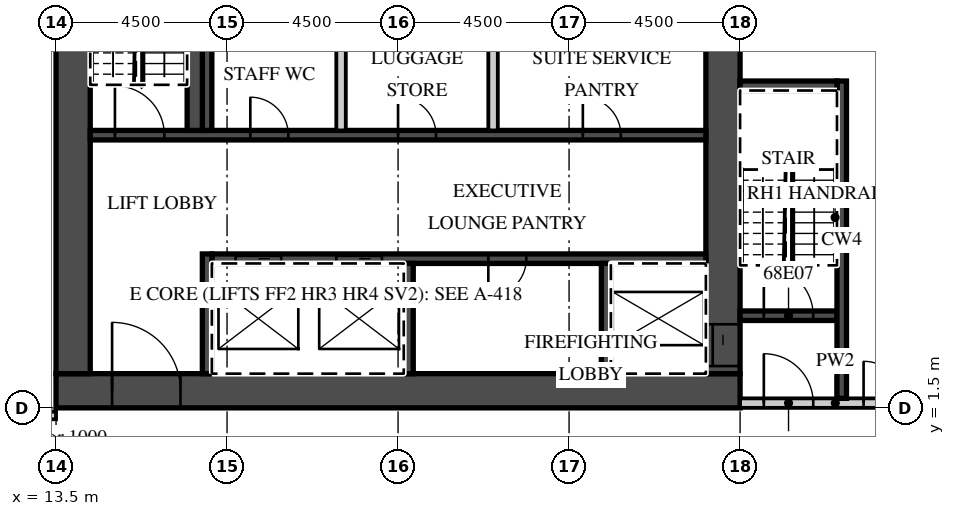
"""IFC4 building model, lengths in metres.
Left out: names, types, materials, properties, quantities, classifications, styles, units other than length and angle.
Written with IfcOpenShell. Run it as: python <this file> out.ifc"""

import sys

from ifc_helpers import new_model, si_unit, direction, frame, frame_2d, origin, place, context, subcontext, project, spatial, rectangle, extrude, element, fill, save


model = new_model("IFC4")
c1 = context("Model", 3, precision=1e-05, world=origin(), true_north=direction((0.0, 1.0)))
c2 = subcontext(c1, "Body", "Model", "MODEL_VIEW")
j1 = project(units=[si_unit("LENGTHUNIT", "METRE"), si_unit("PLANEANGLEUNIT", "RADIAN")], contexts=[c1])
p1 = place(None, origin())
s1 = spatial("IfcSite", under=j1, at=p1, CompositionType="ELEMENT")
p2 = place(p1, origin())
s2 = spatial("IfcBuilding", under=s1, at=p2, CompositionType="ELEMENT")
p3 = place(p2, frame((0.0, 0.0, 275.1)))
s3 = spatial("IfcBuildingStorey", under=s2, at=p3, CompositionType="ELEMENT", Elevation=275.1)
p4 = place(p3, frame((38.132, -12.858, 0.0), z_axis=(0.0, 0.0, 1.0), x_axis=(-0.095847749461, 0.995396006082, 0.0)))
e1 = element("IfcWall", 1, at=p4, inside=s3, PredefinedType="SOLIDWALL", context=c2, shape_type="SweptSolid", body=[
    extrude(rectangle(XDim=32.0, YDim=0.45, at=frame_2d((16.0, 0.0))), origin(), (0.0, 0.0, 1.0), 3.02),
])
p5 = place(p3, frame((-39.909, 1.3, 0.0), z_axis=(0.0, 0.0, 1.0), x_axis=(1.0, 0.0, 0.0)))
e2 = element("IfcWall", 2, at=p5, inside=s3, PredefinedType="PARTITIONING", context=c2, shape_type="SweptSolid", body=[
    extrude(rectangle(XDim=53.409, YDim=0.2, at=frame_2d((26.705, 0.0))), origin(), (0.0, 0.0, 1.0), 3.02),
])
p6 = place(p5, frame((0.15, 0.0, 0.0)))
e3 = element("IfcOpeningElement", 3, at=p6, cuts=e2, PredefinedType="OPENING", context=c2, shape_type="SweptSolid", body=[
    extrude(rectangle(XDim=0.9, YDim=2.1, at=frame_2d((0.45, 1.05))), frame((0.0, 0.11, 0.0), z_axis=(0.0, -1.0, 0.0), x_axis=(1.0, 0.0, 0.0)), (0.0, 0.0, 1.0), 0.22),
])
p7 = place(p5, frame((9.271, 0.0, 0.0)))
e4 = element("IfcOpeningElement", 4, at=p7, cuts=e2, PredefinedType="OPENING", context=c2, shape_type="SweptSolid", body=[
    extrude(rectangle(XDim=1.2, YDim=2.1, at=frame_2d((0.6, 1.05))), frame((0.0, 0.11, 0.0), z_axis=(0.0, -1.0, 0.0), x_axis=(1.0, 0.0, 0.0)), (0.0, 0.0, 1.0), 0.22),
])
p8 = place(p5, frame((18.271, 0.0, 0.0)))
e5 = element("IfcOpeningElement", 5, at=p8, cuts=e2, PredefinedType="OPENING", context=c2, shape_type="SweptSolid", body=[
    extrude(rectangle(XDim=1.2, YDim=2.1, at=frame_2d((0.6, 1.05))), frame((0.0, 0.11, 0.0), z_axis=(0.0, -1.0, 0.0), x_axis=(1.0, 0.0, 0.0)), (0.0, 0.0, 1.0), 0.22),
])
p9 = place(p5, frame((27.271, 0.0, 0.0)))
e6 = element("IfcOpeningElement", 6, at=p9, cuts=e2, PredefinedType="OPENING", context=c2, shape_type="SweptSolid", body=[
    extrude(rectangle(XDim=1.2, YDim=2.1, at=frame_2d((0.6, 1.05))), frame((0.0, 0.11, 0.0), z_axis=(0.0, -1.0, 0.0), x_axis=(1.0, 0.0, 0.0)), (0.0, 0.0, 1.0), 0.22),
])
p10 = place(p5, frame((36.271, 0.0, 0.0)))
e7 = element("IfcOpeningElement", 7, at=p10, cuts=e2, PredefinedType="OPENING", context=c2, shape_type="SweptSolid", body=[
    extrude(rectangle(XDim=1.2, YDim=2.1, at=frame_2d((0.6, 1.05))), frame((0.0, 0.11, 0.0), z_axis=(0.0, -1.0, 0.0), x_axis=(1.0, 0.0, 0.0)), (0.0, 0.0, 1.0), 0.22),
])
p11 = place(p5, frame((42.346, 0.0, 0.0)))
e8 = element("IfcOpeningElement", 8, at=p11, cuts=e2, PredefinedType="OPENING", context=c2, shape_type="SweptSolid", body=[
    extrude(rectangle(XDim=1.2, YDim=2.1, at=frame_2d((0.6, 1.05))), frame((0.0, 0.11, 0.0), z_axis=(0.0, -1.0, 0.0), x_axis=(1.0, 0.0, 0.0)), (0.0, 0.0, 1.0), 0.22),
])
p12 = place(p5, frame((51.834, 0.0, 0.0)))
e9 = element("IfcOpeningElement", 9, at=p12, cuts=e2, PredefinedType="OPENING", context=c2, shape_type="SweptSolid", body=[
    extrude(rectangle(XDim=1.0, YDim=2.1, at=frame_2d((0.5, 1.05))), frame((0.0, 0.11, 0.0), z_axis=(0.0, -1.0, 0.0), x_axis=(1.0, 0.0, 0.0)), (0.0, 0.0, 1.0), 0.22),
])
p13 = place(p3, frame((13.5, 1.95, 0.0), z_axis=(0.0, 0.0, 1.0), x_axis=(1.0, 0.0, 0.0)))
e10 = element("IfcWall", 10, at=p13, inside=s3, PredefinedType="SHEAR", context=c2, shape_type="SweptSolid", body=[
    extrude(rectangle(XDim=18.0, YDim=0.9, at=frame_2d((9.0, 0.0))), origin(), (0.0, 0.0, 1.0), 3.02),
])
p14 = place(p13, frame((1.475, 0.0, 0.0)))
e11 = element("IfcOpeningElement", 11, at=p14, cuts=e10, PredefinedType="OPENING", context=c2, shape_type="SweptSolid", body=[
    extrude(rectangle(XDim=1.8, YDim=2.1, at=frame_2d((0.9, 1.05))), frame((0.0, 0.46, 0.0), z_axis=(0.0, -1.0, 0.0), x_axis=(1.0, 0.0, 0.0)), (0.0, 0.0, 1.0), 0.92),
])
p15 = place(p3, frame((31.05, 2.4, 0.0), z_axis=(0.0, 0.0, 1.0), x_axis=(0.0, 1.0, 0.0)))
e12 = element("IfcWall", 12, at=p15, inside=s3, PredefinedType="SHEAR", context=c2, shape_type="SweptSolid", body=[
    extrude(rectangle(XDim=12.8, YDim=0.9, at=frame_2d((6.4, 0.0))), origin(), (0.0, 0.0, 1.0), 3.02),
])
p16 = place(p15, frame((0.2, 0.0, 0.0)))
e13 = element("IfcOpeningElement", 13, at=p16, cuts=e12, PredefinedType="OPENING", context=c2, shape_type="SweptSolid", body=[
    extrude(rectangle(XDim=1.1, YDim=2.1, at=frame_2d((0.55, 1.05))), frame((0.0, 0.46, 0.0), z_axis=(0.0, -1.0, 0.0), x_axis=(1.0, 0.0, 0.0)), (0.0, 0.0, 1.0), 0.92),
])
p17 = place(p3, frame((13.95, 2.4, 0.0), z_axis=(0.0, 0.0, 1.0), x_axis=(0.0, 1.0, 0.0)))
e14 = element("IfcWall", 14, at=p17, inside=s3, PredefinedType="SHEAR", context=c2, shape_type="SweptSolid", body=[
    extrude(rectangle(XDim=12.2, YDim=0.9, at=frame_2d((6.1, 0.0))), origin(), (0.0, 0.0, 1.0), 3.02),
])
p18 = place(p3, frame((17.6, 5.425, 0.0), z_axis=(0.0, 0.0, 1.0), x_axis=(1.0, 0.0, 0.0)))
e15 = element("IfcWall", 15, at=p18, inside=s3, PredefinedType="SHEAR", context=c2, shape_type="SweptSolid", body=[
    extrude(rectangle(XDim=13.0, YDim=0.25, at=frame_2d((6.5, 0.0))), origin(), (0.0, 0.0, 1.0), 3.02),
])
p19 = place(p18, frame((3.275, 0.0, 0.0)))
e16 = element("IfcOpeningElement", 16, at=p19, cuts=e15, PredefinedType="OPENING", context=c2, shape_type="SweptSolid", body=[
    extrude(rectangle(XDim=1.2, YDim=2.1, at=frame_2d((0.6, 1.05))), frame((0.0, 0.135, 0.0), z_axis=(0.0, -1.0, 0.0), x_axis=(1.0, 0.0, 0.0)), (0.0, 0.0, 1.0), 0.27),
])
p20 = place(p18, frame((0.625, 0.0, 0.0)))
e17 = element("IfcOpeningElement", 17, at=p20, cuts=e15, PredefinedType="OPENING", context=c2, shape_type="SweptSolid", body=[
    extrude(rectangle(XDim=1.2, YDim=2.1, at=frame_2d((0.6, 1.05))), frame((0.0, 0.135, 0.0), z_axis=(0.0, -1.0, 0.0), x_axis=(1.0, 0.0, 0.0)), (0.0, 0.0, 1.0), 0.27),
])
p21 = place(p18, frame((7.275, 0.0, 0.0)))
e18 = element("IfcOpeningElement", 18, at=p21, cuts=e15, PredefinedType="OPENING", context=c2, shape_type="SweptSolid", body=[
    extrude(rectangle(XDim=1.0, YDim=2.1, at=frame_2d((0.5, 1.05))), frame((0.0, 0.135, 0.0), z_axis=(0.0, -1.0, 0.0), x_axis=(1.0, 0.0, 0.0)), (0.0, 0.0, 1.0), 0.27),
])
p22 = place(p3, frame((17.475, 2.4, 0.0), z_axis=(0.0, 0.0, 1.0), x_axis=(0.0, 1.0, 0.0)))
e19 = element("IfcWall", 19, at=p22, inside=s3, PredefinedType="SHEAR", context=c2, shape_type="SweptSolid", body=[
    extrude(rectangle(XDim=3.15, YDim=0.25, at=frame_2d((1.575, 0.0))), origin(), (0.0, 0.0, 1.0), 3.02),
])
for number, where, z_axis, x_axis in (
    (20, (27.975, 2.4, 0.0), (0.0, 0.0, 1.0), (0.0, 1.0, 0.0)),
    (21, (22.775, 2.4, 0.0), (0.0, 0.0, 1.0), (0.0, 1.0, 0.0)),
):
    element("IfcWall", number, at=place(p3, frame(where, z_axis=z_axis, x_axis=x_axis)), inside=s3, PredefinedType="SHEAR", context=c2, shape_type="SweptSolid", body=[
        extrude(rectangle(XDim=2.9, YDim=0.25, at=frame_2d((1.45, 0.0))), origin(), (0.0, 0.0, 1.0), 3.02),
    ])
p23 = place(p3, frame((14.4, 8.675, 0.0), z_axis=(0.0, 0.0, 1.0), x_axis=(1.0, 0.0, 0.0)))
e22 = element("IfcWall", 22, at=p23, inside=s3, PredefinedType="SHEAR", context=c2, shape_type="SweptSolid", body=[
    extrude(rectangle(XDim=16.2, YDim=0.25, at=frame_2d((8.1, 0.0))), origin(), (0.0, 0.0, 1.0), 3.02),
])
p24 = place(p23, frame((0.65, 0.0, 0.0)))
e23 = element("IfcOpeningElement", 23, at=p24, cuts=e22, PredefinedType="OPENING", context=c2, shape_type="SweptSolid", body=[
    extrude(rectangle(XDim=1.3, YDim=2.1, at=frame_2d((0.65, 1.05))), frame((0.0, 0.135, 0.0), z_axis=(0.0, -1.0, 0.0), x_axis=(1.0, 0.0, 0.0)), (0.0, 0.0, 1.0), 0.27),
])
p25 = place(p23, frame((12.962, 0.0, 0.0)))
e24 = element("IfcOpeningElement", 24, at=p25, cuts=e22, PredefinedType="OPENING", context=c2, shape_type="SweptSolid", body=[
    extrude(rectangle(XDim=1.0, YDim=2.1, at=frame_2d((0.5, 1.05))), frame((0.0, 0.135, 0.0), z_axis=(0.0, -1.0, 0.0), x_axis=(1.0, 0.0, 0.0)), (0.0, 0.0, 1.0), 0.27),
])
p26 = place(p23, frame((8.1, 0.0, 0.0)))
e25 = element("IfcOpeningElement", 25, at=p26, cuts=e22, PredefinedType="OPENING", context=c2, shape_type="SweptSolid", body=[
    extrude(rectangle(XDim=1.0, YDim=2.1, at=frame_2d((0.5, 1.05))), frame((0.0, 0.135, 0.0), z_axis=(0.0, -1.0, 0.0), x_axis=(1.0, 0.0, 0.0)), (0.0, 0.0, 1.0), 0.27),
])
p27 = place(p23, frame((4.212, 0.0, 0.0)))
e26 = element("IfcOpeningElement", 26, at=p27, cuts=e22, PredefinedType="OPENING", context=c2, shape_type="SweptSolid", body=[
    extrude(rectangle(XDim=1.0, YDim=2.1, at=frame_2d((0.5, 1.05))), frame((0.0, 0.135, 0.0), z_axis=(0.0, -1.0, 0.0), x_axis=(1.0, 0.0, 0.0)), (0.0, 0.0, 1.0), 0.27),
])
p28 = place(p3, frame((17.475, 8.8, 0.0), z_axis=(0.0, 0.0, 1.0), x_axis=(0.0, 1.0, 0.0)))
e27 = element("IfcWall", 27, at=p28, inside=s3, PredefinedType="SHEAR", context=c2, shape_type="SweptSolid", body=[
    extrude(rectangle(XDim=2.9, YDim=0.25, at=frame_2d((1.45, 0.0))), origin(), (0.0, 0.0, 1.0), 3.02),
])
for number, where, z_axis, x_axis in (
    (28, (25.0, 8.8, 0.0), (0.0, 0.0, 1.0), (0.0, 1.0, 0.0)),
    (29, (21.0, 8.8, 0.0), (0.0, 0.0, 1.0), (0.0, 1.0, 0.0)),
):
    element("IfcWall", number, at=place(p3, frame(where, z_axis=z_axis, x_axis=x_axis)), inside=s3, PredefinedType="PARTITIONING", context=c2, shape_type="SweptSolid", body=[
        extrude(rectangle(XDim=2.9, YDim=0.25, at=frame_2d((1.45, 0.0))), origin(), (0.0, 0.0, 1.0), 3.02),
    ])
p29 = place(p3, frame((17.15, 8.8, 0.0), z_axis=(0.0, 0.0, 1.0), x_axis=(0.0, 1.0, 0.0)))
e30 = element("IfcWall", 30, at=p29, inside=s3, PredefinedType="SHEAR", context=c2, shape_type="SweptSolid", body=[
    extrude(rectangle(XDim=5.8, YDim=0.4, at=frame_2d((2.9, 0.0))), origin(), (0.0, 0.0, 1.0), 3.02),
])
p30 = place(p3, frame((31.5, 1.625, 0.0), z_axis=(0.0, 0.0, 1.0), x_axis=(1.0, 0.0, 0.0)))
e31 = element("IfcWall", 31, at=p30, inside=s3, PredefinedType="PARTITIONING", context=c2, shape_type="SweptSolid", body=[
    extrude(rectangle(XDim=5.012, YDim=0.25, at=frame_2d((2.506, 0.0))), origin(), (0.0, 0.0, 1.0), 3.02),
])
p31 = place(p30, frame((0.625, 0.0, 0.0)))
e32 = element("IfcOpeningElement", 32, at=p31, cuts=e31, PredefinedType="OPENING", context=c2, shape_type="SweptSolid", body=[
    extrude(rectangle(XDim=1.3, YDim=2.1, at=frame_2d((0.65, 1.05))), frame((0.0, 0.135, 0.0), z_axis=(0.0, -1.0, 0.0), x_axis=(1.0, 0.0, 0.0)), (0.0, 0.0, 1.0), 0.27),
])
p32 = place(p30, frame((3.25, 0.0, 0.0)))
e33 = element("IfcOpeningElement", 33, at=p32, cuts=e31, PredefinedType="OPENING", context=c2, shape_type="SweptSolid", body=[
    extrude(rectangle(XDim=1.1, YDim=2.1, at=frame_2d((0.55, 1.05))), frame((0.0, 0.135, 0.0), z_axis=(0.0, -1.0, 0.0), x_axis=(1.0, 0.0, 0.0)), (0.0, 0.0, 1.0), 0.27),
])
p33 = place(p3, frame((31.5, 3.925, 0.0), z_axis=(0.0, 0.0, 1.0), x_axis=(1.0, 0.0, 0.0)))
e34 = element("IfcWall", 34, at=p33, inside=s3, PredefinedType="SHEAR", context=c2, shape_type="SweptSolid", body=[
    extrude(rectangle(XDim=2.55, YDim=0.25, at=frame_2d((1.275, 0.0))), origin(), (0.0, 0.0, 1.0), 3.02),
])
p34 = place(p33, frame((0.625, 0.0, 0.0)))
e35 = element("IfcOpeningElement", 35, at=p34, cuts=e34, PredefinedType="OPENING", context=c2, shape_type="SweptSolid", body=[
    extrude(rectangle(XDim=1.3, YDim=2.1, at=frame_2d((0.65, 1.05))), frame((0.0, 0.135, 0.0), z_axis=(0.0, -1.0, 0.0), x_axis=(1.0, 0.0, 0.0)), (0.0, 0.0, 1.0), 0.27),
])
p35 = place(p3, frame((34.175, 1.75, 0.0), z_axis=(0.0, 0.0, 1.0), x_axis=(0.0, 1.0, 0.0)))
e36 = element("IfcWall", 36, at=p35, inside=s3, PredefinedType="SHEAR", context=c2, shape_type="SweptSolid", body=[
    extrude(rectangle(XDim=8.35, YDim=0.25, at=frame_2d((4.175, 0.0))), origin(), (0.0, 0.0, 1.0), 3.02),
])
p36 = place(p3, frame((31.5, 9.975, 0.0), z_axis=(0.0, 0.0, 1.0), x_axis=(1.0, 0.0, 0.0)))
e37 = element("IfcWall", 37, at=p36, inside=s3, PredefinedType="SHEAR", context=c2, shape_type="SweptSolid", body=[
    extrude(rectangle(XDim=2.55, YDim=0.25, at=frame_2d((1.275, 0.0))), origin(), (0.0, 0.0, 1.0), 3.02),
])
p37 = place(p19, origin())
e38 = element("IfcDoor", 38, at=p37, inside=s3, OperationType="SLIDING_TO_RIGHT", PredefinedType="DOOR", context=c2, shape_type="SweptSolid", body=[
    extrude(rectangle(XDim=1.2, YDim=2.1, at=frame_2d((0.6, 1.05))), frame((0.0, 0.025, 0.0), z_axis=(0.0, -1.0, 0.0), x_axis=(1.0, 0.0, 0.0)), (0.0, 0.0, 1.0), 0.05),
])
fill(e16, e38)
p38 = place(p20, origin())
e39 = element("IfcDoor", 39, at=p38, inside=s3, OperationType="SLIDING_TO_LEFT", PredefinedType="DOOR", context=c2, shape_type="SweptSolid", body=[
    extrude(rectangle(XDim=1.2, YDim=2.1, at=frame_2d((0.6, 1.05))), frame((0.0, 0.025, 0.0), z_axis=(0.0, -1.0, 0.0), x_axis=(1.0, 0.0, 0.0)), (0.0, 0.0, 1.0), 0.05),
])
fill(e17, e39)
p39 = place(p16, origin())
e40 = element("IfcDoor", 40, at=p39, inside=s3, OperationType="SLIDING_TO_LEFT", PredefinedType="DOOR", context=c2, shape_type="SweptSolid", body=[
    extrude(rectangle(XDim=1.1, YDim=2.1, at=frame_2d((0.55, 1.05))), frame((0.0, 0.025, 0.0), z_axis=(0.0, -1.0, 0.0), x_axis=(1.0, 0.0, 0.0)), (0.0, 0.0, 1.0), 0.05),
])
fill(e13, e40)
p40 = place(p14, origin())
e41 = element("IfcDoor", 41, at=p40, inside=s3, OperationType="DOUBLE_DOOR_DOUBLE_SWING", PredefinedType="DOOR", context=c2, shape_type="SweptSolid", body=[
    extrude(rectangle(XDim=1.8, YDim=2.1, at=frame_2d((0.9, 1.05))), frame((0.0, 0.025, 0.0), z_axis=(0.0, -1.0, 0.0), x_axis=(1.0, 0.0, 0.0)), (0.0, 0.0, 1.0), 0.05),
])
fill(e11, e41)
p41 = place(p31, origin())
e42 = element("IfcDoor", 42, at=p41, inside=s3, OperationType="SINGLE_SWING_LEFT", PredefinedType="DOOR", context=c2, shape_type="SweptSolid", body=[
    extrude(rectangle(XDim=1.3, YDim=2.1, at=frame_2d((0.65, 1.05))), frame((0.0, 0.025, 0.0), z_axis=(0.0, -1.0, 0.0), x_axis=(1.0, 0.0, 0.0)), (0.0, 0.0, 1.0), 0.05),
])
fill(e32, e42)
p42 = place(p34, origin())
e43 = element("IfcDoor", 43, at=p42, inside=s3, OperationType="SINGLE_SWING_LEFT", PredefinedType="DOOR", context=c2, shape_type="SweptSolid", body=[
    extrude(rectangle(XDim=1.3, YDim=2.1, at=frame_2d((0.65, 1.05))), frame((0.0, 0.025, 0.0), z_axis=(0.0, -1.0, 0.0), x_axis=(1.0, 0.0, 0.0)), (0.0, 0.0, 1.0), 0.05),
])
fill(e35, e43)
p43 = place(p32, origin())
e44 = element("IfcDoor", 44, at=p43, inside=s3, OperationType="SINGLE_SWING_LEFT", PredefinedType="DOOR", context=c2, shape_type="SweptSolid", body=[
    extrude(rectangle(XDim=1.1, YDim=2.1, at=frame_2d((0.55, 1.05))), frame((0.0, 0.025, 0.0), z_axis=(0.0, -1.0, 0.0), x_axis=(1.0, 0.0, 0.0)), (0.0, 0.0, 1.0), 0.05),
])
fill(e33, e44)
p44 = place(p24, origin())
e45 = element("IfcDoor", 45, at=p44, inside=s3, OperationType="SINGLE_SWING_LEFT", PredefinedType="DOOR", context=c2, shape_type="SweptSolid", body=[
    extrude(rectangle(XDim=1.3, YDim=2.1, at=frame_2d((0.65, 1.05))), frame((0.0, 0.025, 0.0), z_axis=(0.0, -1.0, 0.0), x_axis=(1.0, 0.0, 0.0)), (0.0, 0.0, 1.0), 0.05),
])
fill(e23, e45)
p45 = place(p25, origin())
e46 = element("IfcDoor", 46, at=p45, inside=s3, OperationType="SINGLE_SWING_LEFT", PredefinedType="DOOR", context=c2, shape_type="SweptSolid", body=[
    extrude(rectangle(XDim=1.0, YDim=2.1, at=frame_2d((0.5, 1.05))), frame((0.0, 0.025, 0.0), z_axis=(0.0, -1.0, 0.0), x_axis=(1.0, 0.0, 0.0)), (0.0, 0.0, 1.0), 0.05),
])
fill(e24, e46)
p46 = place(p26, origin())
e47 = element("IfcDoor", 47, at=p46, inside=s3, OperationType="SINGLE_SWING_LEFT", PredefinedType="DOOR", context=c2, shape_type="SweptSolid", body=[
    extrude(rectangle(XDim=1.0, YDim=2.1, at=frame_2d((0.5, 1.05))), frame((0.0, 0.025, 0.0), z_axis=(0.0, -1.0, 0.0), x_axis=(1.0, 0.0, 0.0)), (0.0, 0.0, 1.0), 0.05),
])
fill(e25, e47)
p47 = place(p27, origin())
e48 = element("IfcDoor", 48, at=p47, inside=s3, OperationType="SINGLE_SWING_LEFT", PredefinedType="DOOR", context=c2, shape_type="SweptSolid", body=[
    extrude(rectangle(XDim=1.0, YDim=2.1, at=frame_2d((0.5, 1.05))), frame((0.0, 0.025, 0.0), z_axis=(0.0, -1.0, 0.0), x_axis=(1.0, 0.0, 0.0)), (0.0, 0.0, 1.0), 0.05),
])
fill(e26, e48)
p48 = place(p21, origin())
e49 = element("IfcDoor", 49, at=p48, inside=s3, OperationType="SINGLE_SWING_LEFT", PredefinedType="DOOR", context=c2, shape_type="SweptSolid", body=[
    extrude(rectangle(XDim=1.0, YDim=2.1, at=frame_2d((0.5, 1.05))), frame((0.0, 0.025, 0.0), z_axis=(0.0, -1.0, 0.0), x_axis=(1.0, 0.0, 0.0)), (0.0, 0.0, 1.0), 0.05),
])
fill(e18, e49)
save(model, sys.argv[1])
